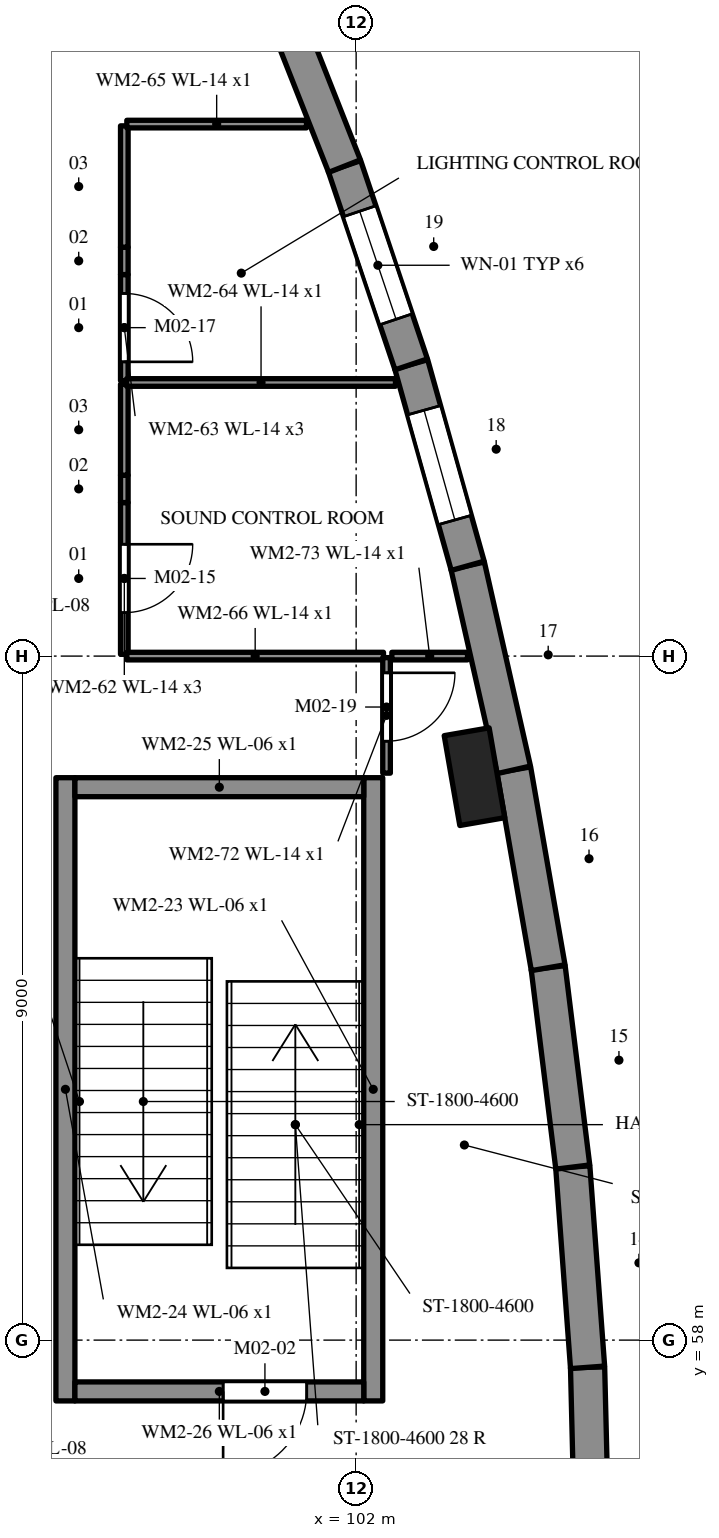
"""IFC4 building model, lengths in metres.
Left out: names, types, materials, properties, quantities, classifications, styles, units other than length and angle.
Written with IfcOpenShell. Run it as: python <this file> out.ifc"""

import sys

from ifc_helpers import new_model, si_unit, direction, frame, frame_2d, origin, origin_2d, place, context, subcontext, project, spatial, polyline, rectangle, outline, extrude, element, fill, save


model = new_model("IFC4")
c1 = context("Model", 3, precision=1e-05, world=origin(), true_north=direction((0.0, 1.0)))
c2 = subcontext(c1, "Body", "Model", "MODEL_VIEW")
j1 = project(units=[si_unit("LENGTHUNIT", "METRE"), si_unit("PLANEANGLEUNIT", "RADIAN")], contexts=[c1])
p1 = place(None, origin())
s1 = spatial("IfcSite", under=j1, at=p1, CompositionType="ELEMENT")
p2 = place(p1, origin())
s2 = spatial("IfcBuilding", under=s1, at=p2, CompositionType="ELEMENT")
p3 = place(p2, frame((0.0, 0.0, 10.2)))
s3 = spatial("IfcBuildingStorey", under=s2, at=p3, CompositionType="ELEMENT", Elevation=10.2)
p4 = place(p3, frame((105.11, 55.0, 0.0), z_axis=(0.0, 0.0, 1.0), x_axis=(-0.024666736886, 0.999695729756, 0.0)))
e1 = element("IfcWall", 1, at=p4, inside=s3, PredefinedType="SOLIDWALL", context=c2, shape_type="SweptSolid", body=[
    extrude(rectangle(XDim=2.643, YDim=0.45, at=frame_2d((1.321, 0.0))), origin(), (0.0, 0.0, 1.0), 4.6),
])
p5 = place(p3, frame((105.045, 57.642, 0.0), z_axis=(0.0, 0.0, 1.0), x_axis=(-0.07363685767, 0.997285121313, 0.0)))
e2 = element("IfcWall", 2, at=p5, inside=s3, PredefinedType="SOLIDWALL", context=c2, shape_type="SweptSolid", body=[
    extrude(rectangle(XDim=2.642, YDim=0.45, at=frame_2d((1.321, 0.0))), origin(), (0.0, 0.0, 1.0), 4.6),
])
p6 = place(p3, frame((104.85, 60.277, 0.0), z_axis=(0.0, 0.0, 1.0), x_axis=(-0.122499610212, 0.992468561466, 0.0)))
e3 = element("IfcWall", 3, at=p6, inside=s3, PredefinedType="SOLIDWALL", context=c2, shape_type="SweptSolid", body=[
    extrude(rectangle(XDim=2.643, YDim=0.45, at=frame_2d((1.321, 0.0))), origin(), (0.0, 0.0, 1.0), 4.6),
])
p7 = place(p3, frame((104.527, 62.9, 0.0), z_axis=(0.0, 0.0, 1.0), x_axis=(-0.171196910379, 0.985236833394, 0.0)))
e4 = element("IfcWall", 4, at=p7, inside=s3, PredefinedType="SOLIDWALL", context=c2, shape_type="SweptSolid", body=[
    extrude(rectangle(XDim=2.643, YDim=0.45, at=frame_2d((1.321, 0.0))), origin(), (0.0, 0.0, 1.0), 4.6),
])
p8 = place(p3, frame((104.074, 65.503, 0.0), z_axis=(0.0, 0.0, 1.0), x_axis=(-0.220347996563, 0.975421324562, 0.0)))
e5 = element("IfcWall", 5, at=p8, inside=s3, PredefinedType="SOLIDWALL", context=c2, shape_type="SweptSolid", body=[
    extrude(rectangle(XDim=2.752, YDim=0.45, at=frame_2d((1.376, 0.0))), origin(), (0.0, 0.0, 1.0), 4.6),
])
p9 = place(p3, frame((103.468, 68.188, 0.0), z_axis=(0.0, 0.0, 1.0), x_axis=(-0.270008269196, 0.962858003324, 0.0)))
e6 = element("IfcWall", 6, at=p9, inside=s3, PredefinedType="SOLIDWALL", context=c2, shape_type="SweptSolid", body=[
    extrude(rectangle(XDim=2.752, YDim=0.45, at=frame_2d((1.376, 0.0))), origin(), (0.0, 0.0, 1.0), 4.6),
])
p10 = place(p9, frame((0.626, 0.0, 0.9)))
e7 = element("IfcOpeningElement", 7, at=p10, cuts=e6, PredefinedType="OPENING", context=c2, shape_type="SweptSolid", body=[
    extrude(rectangle(XDim=1.5, YDim=2.1, at=frame_2d((0.75, 1.05))), frame((0.0, 0.235, 0.0), z_axis=(0.0, -1.0, 0.0), x_axis=(1.0, 0.0, 0.0)), (0.0, 0.0, 1.0), 0.47),
])
p11 = place(p3, frame((102.725, 70.838, 0.0), z_axis=(0.0, 0.0, 1.0), x_axis=(-0.318887614688, 0.947792534893, 0.0)))
e8 = element("IfcWall", 8, at=p11, inside=s3, PredefinedType="SOLIDWALL", context=c2, shape_type="SweptSolid", body=[
    extrude(rectangle(XDim=2.752, YDim=0.45, at=frame_2d((1.376, 0.0))), origin(), (0.0, 0.0, 1.0), 4.6),
])
p12 = place(p11, frame((0.626, 0.0, 0.9)))
e9 = element("IfcOpeningElement", 9, at=p12, cuts=e8, PredefinedType="OPENING", context=c2, shape_type="SweptSolid", body=[
    extrude(rectangle(XDim=1.5, YDim=2.1, at=frame_2d((0.75, 1.05))), frame((0.0, 0.235, 0.0), z_axis=(0.0, -1.0, 0.0), x_axis=(1.0, 0.0, 0.0)), (0.0, 0.0, 1.0), 0.47),
])
p13 = place(p3, frame((101.847, 73.447, 0.0), z_axis=(0.0, 0.0, 1.0), x_axis=(-0.366920100653, 0.930252460215, 0.0)))
e10 = element("IfcWall", 10, at=p13, inside=s3, PredefinedType="SOLIDWALL", context=c2, shape_type="SweptSolid", body=[
    extrude(rectangle(XDim=2.752, YDim=0.45, at=frame_2d((1.376, 0.0))), origin(), (0.0, 0.0, 1.0), 4.6),
])
p14 = place(p3, frame((103.557, 65.414, 0.0), z_axis=(0.0, 0.0, 1.0), x_axis=(-0.171172540003, 0.985241067734, 0.0)))
e11 = element("IfcColumn", 11, at=p14, inside=s3, PredefinedType="PILASTER", context=c2, shape_type="SweptSolid", body=[
    extrude(rectangle(XDim=1.2, YDim=0.6, at=origin_2d()), origin(), (0.0, 0.0, 1.0), 4.6),
])
for number, where, z_axis, x_axis in (
    (12, (102.225, 57.2, 0.0), (0.0, 0.0, 1.0), (0.0, 1.0, 0.0)),
    (13, (98.175, 65.4, 0.0), (0.0, 0.0, 1.0), (0.0, -1.0, 0.0)),
):
    element("IfcWall", number, at=place(p3, frame(where, z_axis=z_axis, x_axis=x_axis)), inside=s3, PredefinedType="SHEAR", context=c2, shape_type="SweptSolid", body=[
        extrude(rectangle(XDim=8.2, YDim=0.25, at=frame_2d((4.1, 0.0))), origin(), (0.0, 0.0, 1.0), 4.6),
    ])
p15 = place(p3, frame((98.3, 65.275, 0.0), z_axis=(0.0, 0.0, 1.0), x_axis=(1.0, 0.0, 0.0)))
e14 = element("IfcWall", 14, at=p15, inside=s3, PredefinedType="SHEAR", context=c2, shape_type="SweptSolid", body=[
    extrude(rectangle(XDim=3.8, YDim=0.25, at=frame_2d((1.9, 0.0))), origin(), (0.0, 0.0, 1.0), 4.6),
])
p16 = place(p3, frame((102.1, 57.325, 0.0), z_axis=(0.0, 0.0, 1.0), x_axis=(-1.0, 0.0, 0.0)))
e15 = element("IfcWall", 15, at=p16, inside=s3, PredefinedType="SHEAR", context=c2, shape_type="SweptSolid", body=[
    extrude(rectangle(XDim=3.8, YDim=0.25, at=frame_2d((1.9, 0.0))), origin(), (0.0, 0.0, 1.0), 4.6),
])
p17 = place(p16, frame((0.75, 0.0, 0.0)))
e16 = element("IfcOpeningElement", 16, at=p17, cuts=e15, PredefinedType="OPENING", context=c2, shape_type="SweptSolid", body=[
    extrude(rectangle(XDim=1.1, YDim=2.1, at=frame_2d((0.55, 1.05))), frame((0.0, 0.135, 0.0), z_axis=(0.0, -1.0, 0.0), x_axis=(1.0, 0.0, 0.0)), (0.0, 0.0, 1.0), 0.27),
])
p18 = place(p3, frame((98.95, 67.023, 0.0), z_axis=(0.0, 0.0, 1.0), x_axis=(0.0, 1.0, 0.0)))
e17 = element("IfcWall", 17, at=p18, inside=s3, PredefinedType="PARTITIONING", context=c2, shape_type="SweptSolid", body=[
    extrude(rectangle(XDim=1.997, YDim=0.1, at=frame_2d((0.999, 0.0))), origin(), (0.0, 0.0, 1.0), 4.35),
])
p19 = place(p18, frame((0.549, 0.0, 0.0)))
e18 = element("IfcOpeningElement", 18, at=p19, cuts=e17, PredefinedType="OPENING", context=c2, shape_type="SweptSolid", body=[
    extrude(rectangle(XDim=0.9, YDim=2.1, at=frame_2d((0.45, 1.05))), frame((0.0, 0.06, 0.0), z_axis=(0.0, -1.0, 0.0), x_axis=(1.0, 0.0, 0.0)), (0.0, 0.0, 1.0), 0.12),
])
p20 = place(p3, frame((98.95, 69.02, 0.0), z_axis=(0.0, 0.0, 1.0), x_axis=(0.0, 1.0, 0.0)))
e19 = element("IfcWall", 19, at=p20, inside=s3, PredefinedType="PARTITIONING", context=c2, shape_type="SweptSolid", body=[
    extrude(rectangle(XDim=0.36, YDim=0.1, at=frame_2d((0.18, 0.0))), origin(), (0.0, 0.0, 1.0), 3.72),
])
p21 = place(p3, frame((98.95, 69.38, 0.0), z_axis=(0.0, 0.0, 1.0), x_axis=(0.0, 1.0, 0.0)))
e20 = element("IfcWall", 20, at=p21, inside=s3, PredefinedType="PARTITIONING", context=c2, shape_type="SweptSolid", body=[
    extrude(rectangle(XDim=1.197, YDim=0.1, at=frame_2d((0.599, 0.0))), origin(), (0.0, 0.0, 1.0), 4.35),
])
p22 = place(p3, frame((98.95, 70.623, 0.0), z_axis=(0.0, 0.0, 1.0), x_axis=(0.0, 1.0, 0.0)))
e21 = element("IfcWall", 21, at=p22, inside=s3, PredefinedType="PARTITIONING", context=c2, shape_type="SweptSolid", body=[
    extrude(rectangle(XDim=1.397, YDim=0.1, at=frame_2d((0.698, 0.0))), origin(), (0.0, 0.0, 1.0), 4.35),
])
p23 = place(p22, frame((0.249, 0.0, 0.0)))
e22 = element("IfcOpeningElement", 22, at=p23, cuts=e21, PredefinedType="OPENING", context=c2, shape_type="SweptSolid", body=[
    extrude(rectangle(XDim=0.9, YDim=2.1, at=frame_2d((0.45, 1.05))), frame((0.0, 0.06, 0.0), z_axis=(0.0, -1.0, 0.0), x_axis=(1.0, 0.0, 0.0)), (0.0, 0.0, 1.0), 0.12),
])
p24 = place(p3, frame((98.95, 72.02, 0.0), z_axis=(0.0, 0.0, 1.0), x_axis=(0.0, 1.0, 0.0)))
e23 = element("IfcWall", 23, at=p24, inside=s3, PredefinedType="PARTITIONING", context=c2, shape_type="SweptSolid", body=[
    extrude(rectangle(XDim=0.36, YDim=0.1, at=frame_2d((0.18, 0.0))), origin(), (0.0, 0.0, 1.0), 3.72),
])
p25 = place(p3, frame((98.95, 72.38, 0.0), z_axis=(0.0, 0.0, 1.0), x_axis=(0.0, 1.0, 0.0)))
e24 = element("IfcWall", 24, at=p25, inside=s3, PredefinedType="PARTITIONING", context=c2, shape_type="SweptSolid", body=[
    extrude(rectangle(XDim=1.597, YDim=0.1, at=frame_2d((0.798, 0.0))), origin(), (0.0, 0.0, 1.0), 4.35),
])
p26 = place(p3, frame((98.98, 70.6, 0.0), z_axis=(0.0, 0.0, 1.0), x_axis=(1.0, 0.0, 0.0)))
e25 = element("IfcWall", 25, at=p26, inside=s3, PredefinedType="PARTITIONING", context=c2, shape_type="SweptSolid", body=[
    extrude(rectangle(XDim=3.538, YDim=0.1, at=frame_2d((1.769, 0.0))), origin(), (0.0, 0.0, 1.0), 4.35),
])
p27 = place(p3, frame((98.983, 74.0, 0.0), z_axis=(0.0, 0.0, 1.0), x_axis=(1.0, 0.0, 0.0)))
e26 = element("IfcWall", 26, at=p27, inside=s3, PredefinedType="PARTITIONING", context=c2, shape_type="SweptSolid", body=[
    extrude(rectangle(XDim=2.364, YDim=0.1, at=frame_2d((1.182, 0.0))), origin(), (0.0, 0.0, 1.0), 4.35),
])
p28 = place(p3, frame((102.36, 67.0, 0.0), z_axis=(0.0, 0.0, 1.0), x_axis=(-1.0, 0.0, 0.0)))
e27 = element("IfcWall", 27, at=p28, inside=s3, PredefinedType="PARTITIONING", context=c2, shape_type="SweptSolid", body=[
    extrude(rectangle(XDim=3.377, YDim=0.1, at=frame_2d((1.688, 0.0))), origin(), (0.0, 0.0, 1.0), 4.35),
])
p29 = place(p3, frame((102.4, 65.46, 0.0), z_axis=(0.0, 0.0, 1.0), x_axis=(0.0, 1.0, 0.0)))
e28 = element("IfcWall", 28, at=p29, inside=s3, PredefinedType="PARTITIONING", context=c2, shape_type="SweptSolid", body=[
    extrude(outline(polyline([(0.0, 0.0), (1.52, 0.0), (1.52, 4.35), (0.947, 4.35), (0.945, 3.62), (0.535, 3.62), (0.533, 4.35), (0.0, 4.35), (0.0, 0.0)])), frame((0.0, 0.05, 0.0), z_axis=(0.0, -1.0, 0.0), x_axis=(1.0, 0.0, 0.0)), (0.0, 0.0, 1.0), 0.1),
])
p30 = place(p29, frame((0.42, 0.0, 0.0)))
e29 = element("IfcOpeningElement", 29, at=p30, cuts=e28, PredefinedType="OPENING", context=c2, shape_type="SweptSolid", body=[
    extrude(rectangle(XDim=0.9, YDim=2.1, at=frame_2d((0.45, 1.05))), frame((0.0, 0.06, 0.0), z_axis=(0.0, -1.0, 0.0), x_axis=(1.0, 0.0, 0.0)), (0.0, 0.0, 1.0), 0.12),
])
p31 = place(p3, frame((103.465, 67.0, 0.0), z_axis=(0.0, 0.0, 1.0), x_axis=(-1.0, 0.0, 0.0)))
e30 = element("IfcWall", 30, at=p31, inside=s3, PredefinedType="PARTITIONING", context=c2, shape_type="SweptSolid", body=[
    extrude(rectangle(XDim=0.995, YDim=0.1, at=frame_2d((0.498, 0.0))), origin(), (0.0, 0.0, 1.0), 4.35),
])
p32 = place(p17, origin())
e31 = element("IfcDoor", 31, at=p32, inside=s3, OperationType="SINGLE_SWING_RIGHT", PredefinedType="DOOR", context=c2, shape_type="SweptSolid", body=[
    extrude(rectangle(XDim=1.1, YDim=2.1, at=frame_2d((0.55, 1.05))), frame((0.0, 0.025, 0.0), z_axis=(0.0, -1.0, 0.0), x_axis=(1.0, 0.0, 0.0)), (0.0, 0.0, 1.0), 0.05),
])
fill(e16, e31)
p33 = place(p10, origin())
e32 = element("IfcWindow", 32, at=p33, inside=s3, PartitioningType="SINGLE_PANEL", PredefinedType="WINDOW", context=c2, shape_type="SweptSolid", body=[
    extrude(rectangle(XDim=1.5, YDim=2.1, at=frame_2d((0.75, 1.05))), frame((0.0, 0.03, 0.0), z_axis=(0.0, -1.0, 0.0), x_axis=(1.0, 0.0, 0.0)), (0.0, 0.0, 1.0), 0.06),
])
fill(e7, e32)
p34 = place(p12, origin())
e33 = element("IfcWindow", 33, at=p34, inside=s3, PartitioningType="SINGLE_PANEL", PredefinedType="WINDOW", context=c2, shape_type="SweptSolid", body=[
    extrude(rectangle(XDim=1.5, YDim=2.1, at=frame_2d((0.75, 1.05))), frame((0.0, 0.03, 0.0), z_axis=(0.0, -1.0, 0.0), x_axis=(1.0, 0.0, 0.0)), (0.0, 0.0, 1.0), 0.06),
])
fill(e9, e33)
p35 = place(p19, frame((0.9, 0.0, 0.0), z_axis=(0.0, 0.0, 1.0), x_axis=(-1.0, 0.0, 0.0)))
e34 = element("IfcDoor", 34, at=p35, inside=s3, OperationType="SINGLE_SWING_LEFT", PredefinedType="DOOR", context=c2, shape_type="SweptSolid", body=[
    extrude(rectangle(XDim=0.9, YDim=2.1, at=frame_2d((0.45, 1.05))), frame((0.0, 0.025, 0.0), z_axis=(0.0, -1.0, 0.0), x_axis=(1.0, 0.0, 0.0)), (0.0, 0.0, 1.0), 0.05),
])
fill(e18, e34)
p36 = place(p23, frame((0.9, 0.0, 0.0), z_axis=(0.0, 0.0, 1.0), x_axis=(-1.0, 0.0, 0.0)))
e35 = element("IfcDoor", 35, at=p36, inside=s3, OperationType="SINGLE_SWING_RIGHT", PredefinedType="DOOR", context=c2, shape_type="SweptSolid", body=[
    extrude(rectangle(XDim=0.9, YDim=2.1, at=frame_2d((0.45, 1.05))), frame((0.0, 0.025, 0.0), z_axis=(0.0, -1.0, 0.0), x_axis=(1.0, 0.0, 0.0)), (0.0, 0.0, 1.0), 0.05),
])
fill(e22, e35)
p37 = place(p30, frame((0.9, 0.0, 0.0), z_axis=(0.0, 0.0, 1.0), x_axis=(-1.0, 0.0, 0.0)))
e36 = element("IfcDoor", 36, at=p37, inside=s3, OperationType="SINGLE_SWING_LEFT", PredefinedType="DOOR", context=c2, shape_type="SweptSolid", body=[
    extrude(rectangle(XDim=0.9, YDim=2.1, at=frame_2d((0.45, 1.05))), frame((0.0, 0.025, 0.0), z_axis=(0.0, -1.0, 0.0), x_axis=(1.0, 0.0, 0.0)), (0.0, 0.0, 1.0), 0.05),
])
fill(e29, e36)
save(model, sys.argv[1])
